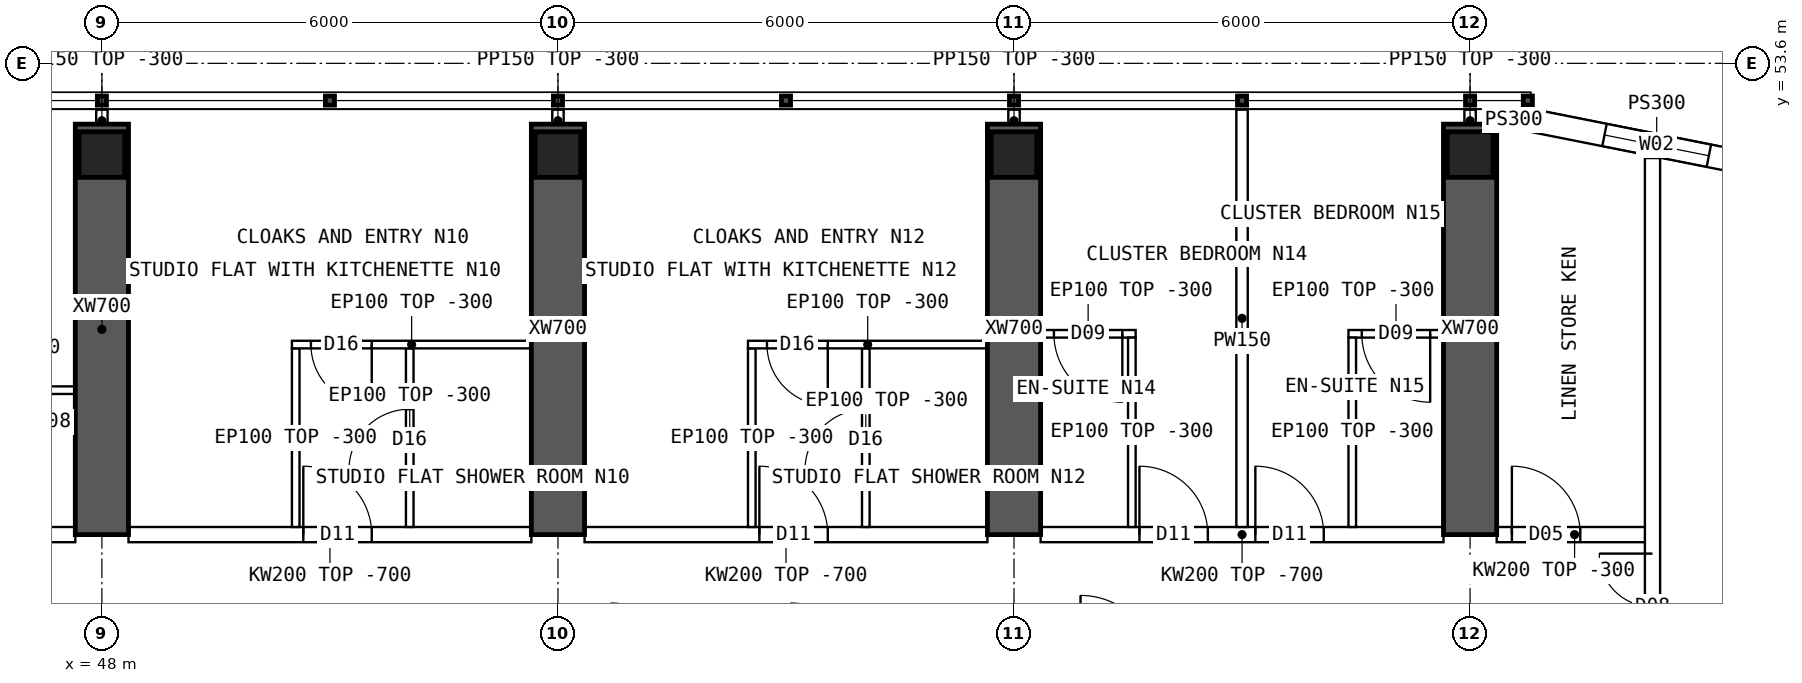
"""IFC4 building model, lengths in metres.
Left out: names, types, materials, properties, quantities, classifications, styles, units other than length and angle.
Written with IfcOpenShell. Run it as: python <this file> out.ifc"""

import sys

from ifc_helpers import new_model, si_unit, direction, frame, frame_2d, origin, origin_2d, place, context, subcontext, project, spatial, polyline, rectangle, hollow_rectangle, outline, extrude, element, fill, save


model = new_model("IFC4")
c1 = context("Model", 3, precision=1e-05, world=origin(), true_north=direction((0.0, 1.0)))
c2 = subcontext(c1, "Body", "Model", "MODEL_VIEW")
j1 = project(units=[si_unit("LENGTHUNIT", "METRE"), si_unit("PLANEANGLEUNIT", "RADIAN")], contexts=[c1])
p1 = place(None, origin())
s1 = spatial("IfcSite", under=j1, at=p1, CompositionType="ELEMENT")
p2 = place(p1, origin())
s2 = spatial("IfcBuilding", under=s1, at=p2, CompositionType="ELEMENT")
p3 = place(p2, frame((0.0, 0.0, 254.05)))
s3 = spatial("IfcBuildingStorey", under=s2, at=p3, CompositionType="ELEMENT", Elevation=254.05)
for number, where, z_axis, x_axis in (
    (1, (48.0, 52.4, 0.0), (0.0, 0.0, 1.0), (1.0, 0.0, 0.0)),
    (2, (54.0, 52.4, 0.0), (0.0, 0.0, 1.0), (1.0, 0.0, 0.0)),
    (3, (60.0, 52.4, 0.0), (0.0, 0.0, 1.0), (1.0, 0.0, 0.0)),
    (4, (66.0, 52.4, 0.0), (0.0, 0.0, 1.0), (1.0, 0.0, 0.0)),
):
    element("IfcColumn", number, at=place(p3, frame(where, z_axis=z_axis, x_axis=x_axis)), inside=s3, PredefinedType="COLUMN", context=c2, shape_type="SweptSolid", body=[
        extrude(hollow_rectangle(XDim=0.6, YDim=0.6, WallThickness=0.06, at=origin_2d()), origin(), (0.0, 0.0, 1.0), 3.75),
    ])
for number, where, z_axis, x_axis in (
    (5, (48.0, 47.4, 0.0), (0.0, 0.0, 1.0), (0.0, 1.0, 0.0)),
    (6, (54.0, 47.4, 0.0), (0.0, 0.0, 1.0), (0.0, 1.0, 0.0)),
    (7, (60.0, 47.4, 0.0), (0.0, 0.0, 1.0), (0.0, 1.0, 0.0)),
    (8, (66.0, 47.4, 0.0), (0.0, 0.0, 1.0), (0.0, 1.0, 0.0)),
):
    element("IfcWall", number, at=place(p3, frame(where, z_axis=z_axis, x_axis=x_axis)), inside=s3, PredefinedType="SHEAR", context=c2, shape_type="SweptSolid", body=[
        extrude(rectangle(XDim=5.4, YDim=0.7, at=frame_2d((2.7, 0.0))), origin(), (0.0, 0.0, 1.0), 3.75),
    ])
p4 = place(p3, frame((70.11, 52.192, 0.0), z_axis=(0.0, 0.0, 1.0), x_axis=(-0.98078325777, 0.195100490205, 0.0)))
e9 = element("IfcWall", 9, at=p4, inside=s3, PredefinedType="SOLIDWALL", context=c2, shape_type="SweptSolid", body=[
    extrude(outline(polyline([(-0.03, -0.15), (3.405, -0.15), (3.345, 0.15), (0.03, 0.15), (-0.03, -0.15)])), origin(), (0.0, 0.0, 1.0), 3.45),
])
p5 = place(p4, frame((0.988, 0.0, 0.9)))
e10 = element("IfcOpeningElement", 10, at=p5, cuts=e9, PredefinedType="OPENING", context=c2, shape_type="SweptSolid", body=[
    extrude(rectangle(XDim=1.4, YDim=1.8, at=frame_2d((0.7, 0.9))), frame((0.0, 0.16, 0.0), z_axis=(0.0, -1.0, 0.0), x_axis=(1.0, 0.0, 0.0)), (0.0, 0.0, 1.0), 0.32),
])
p6 = place(p3, frame((66.8, 52.85, 0.0), z_axis=(0.0, 0.0, 1.0), x_axis=(-1.0, 0.0, 0.0)))
e11 = element("IfcWall", 11, at=p6, inside=s3, PredefinedType="SOLIDWALL", context=c2, shape_type="SweptSolid", body=[
    extrude(rectangle(XDim=0.45, YDim=0.3, at=frame_2d((0.225, 0.0))), origin(), (0.0, 0.0, 1.0), 3.45),
])
p7 = place(p3, frame((42.35, 47.4, 0.0), z_axis=(0.0, 0.0, 1.0), x_axis=(1.0, 0.0, 0.0)))
e12 = element("IfcWall", 12, at=p7, inside=s3, PredefinedType="SOLIDWALL", context=c2, shape_type="SweptSolid", body=[
    extrude(outline(polyline([(0.0, 0.0), (5.3, 0.0), (5.3, 3.05), (0.0, 3.05), (0.0, 0.0)])), frame((0.0, 0.1, 0.0), z_axis=(0.0, -1.0, 0.0), x_axis=(1.0, 0.0, 0.0)), (0.0, 0.0, 1.0), 0.2),
])
p8 = place(p7, frame((0.1, 0.0, 0.0)))
e13 = element("IfcOpeningElement", 13, at=p8, cuts=e12, PredefinedType="OPENING", context=c2, shape_type="SweptSolid", body=[
    extrude(rectangle(XDim=0.9, YDim=2.1, at=frame_2d((0.45, 1.05))), frame((0.0, 0.11, 0.0), z_axis=(0.0, -1.0, 0.0), x_axis=(1.0, 0.0, 0.0)), (0.0, 0.0, 1.0), 0.22),
])
p9 = place(p3, frame((48.35, 47.4, 0.0), z_axis=(0.0, 0.0, 1.0), x_axis=(1.0, 0.0, 0.0)))
e14 = element("IfcWall", 14, at=p9, inside=s3, PredefinedType="SOLIDWALL", context=c2, shape_type="SweptSolid", body=[
    extrude(outline(polyline([(0.0, 0.0), (5.3, 0.0), (5.3, 3.05), (0.0, 3.05), (0.0, 0.0)])), frame((0.0, 0.1, 0.0), z_axis=(0.0, -1.0, 0.0), x_axis=(1.0, 0.0, 0.0)), (0.0, 0.0, 1.0), 0.2),
])
p10 = place(p9, frame((2.3, 0.0, 0.0)))
e15 = element("IfcOpeningElement", 15, at=p10, cuts=e14, PredefinedType="OPENING", context=c2, shape_type="SweptSolid", body=[
    extrude(rectangle(XDim=0.9, YDim=2.1, at=frame_2d((0.45, 1.05))), frame((0.0, 0.11, 0.0), z_axis=(0.0, -1.0, 0.0), x_axis=(1.0, 0.0, 0.0)), (0.0, 0.0, 1.0), 0.22),
])
p11 = place(p3, frame((54.35, 47.4, 0.0), z_axis=(0.0, 0.0, 1.0), x_axis=(1.0, 0.0, 0.0)))
e16 = element("IfcWall", 16, at=p11, inside=s3, PredefinedType="SOLIDWALL", context=c2, shape_type="SweptSolid", body=[
    extrude(outline(polyline([(0.0, 0.0), (5.3, 0.0), (5.3, 3.05), (0.0, 3.05), (0.0, 0.0)])), frame((0.0, 0.1, 0.0), z_axis=(0.0, -1.0, 0.0), x_axis=(1.0, 0.0, 0.0)), (0.0, 0.0, 1.0), 0.2),
])
p12 = place(p11, frame((2.3, 0.0, 0.0)))
e17 = element("IfcOpeningElement", 17, at=p12, cuts=e16, PredefinedType="OPENING", context=c2, shape_type="SweptSolid", body=[
    extrude(rectangle(XDim=0.9, YDim=2.1, at=frame_2d((0.45, 1.05))), frame((0.0, 0.11, 0.0), z_axis=(0.0, -1.0, 0.0), x_axis=(1.0, 0.0, 0.0)), (0.0, 0.0, 1.0), 0.22),
])
p13 = place(p3, frame((60.35, 47.4, 0.0), z_axis=(0.0, 0.0, 1.0), x_axis=(1.0, 0.0, 0.0)))
e18 = element("IfcWall", 18, at=p13, inside=s3, PredefinedType="SOLIDWALL", context=c2, shape_type="SweptSolid", body=[
    extrude(outline(polyline([(0.0, 0.0), (5.3, 0.0), (5.3, 3.05), (0.0, 3.05), (0.0, 0.0)])), frame((0.0, 0.1, 0.0), z_axis=(0.0, -1.0, 0.0), x_axis=(1.0, 0.0, 0.0)), (0.0, 0.0, 1.0), 0.2),
])
p14 = place(p13, frame((1.3, 0.0, 0.0)))
e19 = element("IfcOpeningElement", 19, at=p14, cuts=e18, PredefinedType="OPENING", context=c2, shape_type="SweptSolid", body=[
    extrude(rectangle(XDim=0.9, YDim=2.1, at=frame_2d((0.45, 1.05))), frame((0.0, 0.11, 0.0), z_axis=(0.0, -1.0, 0.0), x_axis=(1.0, 0.0, 0.0)), (0.0, 0.0, 1.0), 0.22),
])
p15 = place(p13, frame((2.825, 0.0, 0.0)))
e20 = element("IfcOpeningElement", 20, at=p15, cuts=e18, PredefinedType="OPENING", context=c2, shape_type="SweptSolid", body=[
    extrude(rectangle(XDim=0.9, YDim=2.1, at=frame_2d((0.45, 1.05))), frame((0.0, 0.11, 0.0), z_axis=(0.0, -1.0, 0.0), x_axis=(1.0, 0.0, 0.0)), (0.0, 0.0, 1.0), 0.22),
])
p16 = place(p3, frame((66.35, 47.4, 0.0), z_axis=(0.0, 0.0, 1.0), x_axis=(1.0, 0.0, 0.0)))
e21 = element("IfcWall", 21, at=p16, inside=s3, PredefinedType="SOLIDWALL", context=c2, shape_type="SweptSolid", body=[
    extrude(rectangle(XDim=2.05, YDim=0.2, at=frame_2d((1.025, 0.0))), origin(), (0.0, 0.0, 1.0), 3.45),
])
p17 = place(p16, frame((0.2, 0.0, 0.0)))
e22 = element("IfcOpeningElement", 22, at=p17, cuts=e21, PredefinedType="OPENING", context=c2, shape_type="SweptSolid", body=[
    extrude(rectangle(XDim=0.9, YDim=2.1, at=frame_2d((0.45, 1.05))), frame((0.0, 0.11, 0.0), z_axis=(0.0, -1.0, 0.0), x_axis=(1.0, 0.0, 0.0)), (0.0, 0.0, 1.0), 0.22),
])
p18 = place(p3, frame((45.1, 49.3, 0.0), z_axis=(0.0, 0.0, 1.0), x_axis=(1.0, 0.0, 0.0)))
e23 = element("IfcWall", 23, at=p18, inside=s3, PredefinedType="PARTITIONING", context=c2, shape_type="SweptSolid", body=[
    extrude(rectangle(XDim=2.55, YDim=0.1, at=frame_2d((1.275, 0.0))), origin(), (0.0, 0.0, 1.0), 3.45),
])
p19 = place(p18, frame((0.825, 0.0, 0.0)))
e24 = element("IfcOpeningElement", 24, at=p19, cuts=e23, PredefinedType="OPENING", context=c2, shape_type="SweptSolid", body=[
    extrude(rectangle(XDim=0.9, YDim=2.1, at=frame_2d((0.45, 1.05))), frame((0.0, 0.06, 0.0), z_axis=(0.0, -1.0, 0.0), x_axis=(1.0, 0.0, 0.0)), (0.0, 0.0, 1.0), 0.12),
])
p20 = place(p3, frame((50.5, 49.9, 0.0), z_axis=(0.0, 0.0, 1.0), x_axis=(1.0, 0.0, 0.0)))
e25 = element("IfcWall", 25, at=p20, inside=s3, PredefinedType="PARTITIONING", context=c2, shape_type="SweptSolid", body=[
    extrude(rectangle(XDim=3.15, YDim=0.1, at=frame_2d((1.575, 0.0))), origin(), (0.0, 0.0, 1.0), 3.45),
])
p21 = place(p20, frame((0.25, 0.0, 0.0)))
e26 = element("IfcOpeningElement", 26, at=p21, cuts=e25, PredefinedType="OPENING", context=c2, shape_type="SweptSolid", body=[
    extrude(rectangle(XDim=0.8, YDim=2.1, at=frame_2d((0.4, 1.05))), frame((0.0, 0.06, 0.0), z_axis=(0.0, -1.0, 0.0), x_axis=(1.0, 0.0, 0.0)), (0.0, 0.0, 1.0), 0.12),
])
p22 = place(p3, frame((50.55, 49.85, 0.0), z_axis=(0.0, 0.0, 1.0), x_axis=(0.0, -1.0, 0.0)))
e27 = element("IfcWall", 27, at=p22, inside=s3, PredefinedType="PARTITIONING", context=c2, shape_type="SweptSolid", body=[
    extrude(outline(polyline([(0.0, 0.0), (2.35, 0.0), (2.35, 3.05), (2.302, 3.05), (2.3, 3.45), (0.0, 3.45), (0.0, 0.0)])), frame((0.0, 0.05, 0.0), z_axis=(0.0, -1.0, 0.0), x_axis=(1.0, 0.0, 0.0)), (0.0, 0.0, 1.0), 0.1),
])
p23 = place(p3, frame((52.05, 49.85, 0.0), z_axis=(0.0, 0.0, 1.0), x_axis=(0.0, -1.0, 0.0)))
e28 = element("IfcWall", 28, at=p23, inside=s3, PredefinedType="PARTITIONING", context=c2, shape_type="SweptSolid", body=[
    extrude(outline(polyline([(0.0, 0.0), (2.35, 0.0), (2.35, 3.05), (2.302, 3.05), (2.3, 3.45), (0.0, 3.45), (0.0, 0.0)])), frame((0.0, 0.05, 0.0), z_axis=(0.0, -1.0, 0.0), x_axis=(1.0, 0.0, 0.0)), (0.0, 0.0, 1.0), 0.1),
])
p24 = place(p23, frame((0.8, 0.0, 0.0)))
e29 = element("IfcOpeningElement", 29, at=p24, cuts=e28, PredefinedType="OPENING", context=c2, shape_type="SweptSolid", body=[
    extrude(rectangle(XDim=0.8, YDim=2.1, at=frame_2d((0.4, 1.05))), frame((0.0, 0.06, 0.0), z_axis=(0.0, -1.0, 0.0), x_axis=(1.0, 0.0, 0.0)), (0.0, 0.0, 1.0), 0.12),
])
p25 = place(p3, frame((56.5, 49.9, 0.0), z_axis=(0.0, 0.0, 1.0), x_axis=(1.0, 0.0, 0.0)))
e30 = element("IfcWall", 30, at=p25, inside=s3, PredefinedType="PARTITIONING", context=c2, shape_type="SweptSolid", body=[
    extrude(rectangle(XDim=3.15, YDim=0.1, at=frame_2d((1.575, 0.0))), origin(), (0.0, 0.0, 1.0), 3.45),
])
p26 = place(p25, frame((0.25, 0.0, 0.0)))
e31 = element("IfcOpeningElement", 31, at=p26, cuts=e30, PredefinedType="OPENING", context=c2, shape_type="SweptSolid", body=[
    extrude(rectangle(XDim=0.8, YDim=2.1, at=frame_2d((0.4, 1.05))), frame((0.0, 0.06, 0.0), z_axis=(0.0, -1.0, 0.0), x_axis=(1.0, 0.0, 0.0)), (0.0, 0.0, 1.0), 0.12),
])
p27 = place(p3, frame((56.55, 49.85, 0.0), z_axis=(0.0, 0.0, 1.0), x_axis=(0.0, -1.0, 0.0)))
e32 = element("IfcWall", 32, at=p27, inside=s3, PredefinedType="PARTITIONING", context=c2, shape_type="SweptSolid", body=[
    extrude(outline(polyline([(0.0, 0.0), (2.35, 0.0), (2.35, 3.05), (2.302, 3.05), (2.3, 3.45), (0.0, 3.45), (0.0, 0.0)])), frame((0.0, 0.05, 0.0), z_axis=(0.0, -1.0, 0.0), x_axis=(1.0, 0.0, 0.0)), (0.0, 0.0, 1.0), 0.1),
])
p28 = place(p3, frame((58.05, 49.85, 0.0), z_axis=(0.0, 0.0, 1.0), x_axis=(0.0, -1.0, 0.0)))
e33 = element("IfcWall", 33, at=p28, inside=s3, PredefinedType="PARTITIONING", context=c2, shape_type="SweptSolid", body=[
    extrude(outline(polyline([(0.0, 0.0), (2.35, 0.0), (2.35, 3.05), (2.302, 3.05), (2.3, 3.45), (0.0, 3.45), (0.0, 0.0)])), frame((0.0, 0.05, 0.0), z_axis=(0.0, -1.0, 0.0), x_axis=(1.0, 0.0, 0.0)), (0.0, 0.0, 1.0), 0.1),
])
p29 = place(p28, frame((0.8, 0.0, 0.0)))
e34 = element("IfcOpeningElement", 34, at=p29, cuts=e33, PredefinedType="OPENING", context=c2, shape_type="SweptSolid", body=[
    extrude(rectangle(XDim=0.8, YDim=2.1, at=frame_2d((0.4, 1.05))), frame((0.0, 0.06, 0.0), z_axis=(0.0, -1.0, 0.0), x_axis=(1.0, 0.0, 0.0)), (0.0, 0.0, 1.0), 0.12),
])
p30 = place(p3, frame((63.0, 52.99, 0.0), z_axis=(0.0, 0.0, 1.0), x_axis=(0.0, -1.0, 0.0)))
e35 = element("IfcWall", 35, at=p30, inside=s3, PredefinedType="PARTITIONING", context=c2, shape_type="SweptSolid", body=[
    extrude(outline(polyline([(0.0, 0.0), (5.49, 0.0), (5.49, 3.05), (5.442, 3.05), (5.44, 3.45), (0.792, 3.45), (0.79, 3.05), (0.392, 3.05), (0.39, 3.45), (0.0, 3.45), (0.0, 0.0)])), frame((0.0, 0.075, 0.0), z_axis=(0.0, -1.0, 0.0), x_axis=(1.0, 0.0, 0.0)), (0.0, 0.0, 1.0), 0.15),
])
p31 = place(p3, frame((60.35, 50.042, 0.0), z_axis=(0.0, 0.0, 1.0), x_axis=(1.0, 0.0, 0.0)))
e36 = element("IfcWall", 36, at=p31, inside=s3, PredefinedType="PARTITIONING", context=c2, shape_type="SweptSolid", body=[
    extrude(rectangle(XDim=1.25, YDim=0.1, at=frame_2d((0.625, 0.0))), origin(), (0.0, 0.0, 1.0), 3.45),
])
p32 = place(p31, frame((0.175, 0.0, 0.0)))
e37 = element("IfcOpeningElement", 37, at=p32, cuts=e36, PredefinedType="OPENING", context=c2, shape_type="SweptSolid", body=[
    extrude(rectangle(XDim=0.9, YDim=2.1, at=frame_2d((0.45, 1.05))), frame((0.0, 0.06, 0.0), z_axis=(0.0, -1.0, 0.0), x_axis=(1.0, 0.0, 0.0)), (0.0, 0.0, 1.0), 0.12),
])
p33 = place(p3, frame((61.55, 49.992, 0.0), z_axis=(0.0, 0.0, 1.0), x_axis=(0.0, -1.0, 0.0)))
e38 = element("IfcWall", 38, at=p33, inside=s3, PredefinedType="PARTITIONING", context=c2, shape_type="SweptSolid", body=[
    extrude(outline(polyline([(0.0, 0.0), (2.492, 0.0), (2.492, 3.05), (2.444, 3.05), (2.442, 3.45), (0.0, 3.45), (0.0, 0.0)])), frame((0.0, 0.05, 0.0), z_axis=(0.0, -1.0, 0.0), x_axis=(1.0, 0.0, 0.0)), (0.0, 0.0, 1.0), 0.1),
])
p34 = place(p3, frame((64.4, 50.042, 0.0), z_axis=(0.0, 0.0, 1.0), x_axis=(1.0, 0.0, 0.0)))
e39 = element("IfcWall", 39, at=p34, inside=s3, PredefinedType="PARTITIONING", context=c2, shape_type="SweptSolid", body=[
    extrude(rectangle(XDim=1.25, YDim=0.1, at=frame_2d((0.625, 0.0))), origin(), (0.0, 0.0, 1.0), 3.45),
])
p35 = place(p34, frame((0.175, 0.0, 0.0)))
e40 = element("IfcOpeningElement", 40, at=p35, cuts=e39, PredefinedType="OPENING", context=c2, shape_type="SweptSolid", body=[
    extrude(rectangle(XDim=0.9, YDim=2.1, at=frame_2d((0.45, 1.05))), frame((0.0, 0.06, 0.0), z_axis=(0.0, -1.0, 0.0), x_axis=(1.0, 0.0, 0.0)), (0.0, 0.0, 1.0), 0.12),
])
p36 = place(p3, frame((64.45, 49.992, 0.0), z_axis=(0.0, 0.0, 1.0), x_axis=(0.0, -1.0, 0.0)))
e41 = element("IfcWall", 41, at=p36, inside=s3, PredefinedType="PARTITIONING", context=c2, shape_type="SweptSolid", body=[
    extrude(outline(polyline([(0.0, 0.0), (2.492, 0.0), (2.492, 3.05), (2.444, 3.05), (2.442, 3.45), (0.0, 3.45), (0.0, 0.0)])), frame((0.0, 0.05, 0.0), z_axis=(0.0, -1.0, 0.0), x_axis=(1.0, 0.0, 0.0)), (0.0, 0.0, 1.0), 0.1),
])
p37 = place(p3, frame((68.4, 11.646, 0.0), z_axis=(0.0, 0.0, 1.0), x_axis=(0.0, 1.0, 0.0)))
e42 = element("IfcWall", 42, at=p37, inside=s3, PredefinedType="SOLIDWALL", context=c2, shape_type="SweptSolid", body=[
    extrude(rectangle(XDim=40.708, YDim=0.2, at=frame_2d((20.354, 0.0))), origin(), (0.0, 0.0, 1.0), 3.45),
])
p38 = place(p37, frame((5.104, 0.0, 0.0)))
e43 = element("IfcOpeningElement", 43, at=p38, cuts=e42, PredefinedType="OPENING", context=c2, shape_type="SweptSolid", body=[
    extrude(rectangle(XDim=1.4, YDim=2.1, at=frame_2d((0.7, 1.05))), frame((0.0, 0.11, 0.0), z_axis=(0.0, -1.0, 0.0), x_axis=(1.0, 0.0, 0.0)), (0.0, 0.0, 1.0), 0.22),
])
p39 = place(p37, frame((34.104, 0.0, 0.0)))
e44 = element("IfcOpeningElement", 44, at=p39, cuts=e42, PredefinedType="OPENING", context=c2, shape_type="SweptSolid", body=[
    extrude(rectangle(XDim=1.4, YDim=2.1, at=frame_2d((0.7, 1.05))), frame((0.0, 0.11, 0.0), z_axis=(0.0, -1.0, 0.0), x_axis=(1.0, 0.0, 0.0)), (0.0, 0.0, 1.0), 0.22),
])
for number, where, z_axis, x_axis in (
    (45, (48.0, 52.7, 0.0), (0.0, 0.0, 1.0), (0.0, 1.0, 0.0)),
    (46, (54.0, 52.7, 0.0), (0.0, 0.0, 1.0), (0.0, 1.0, 0.0)),
    (47, (60.0, 52.7, 0.0), (0.0, 0.0, 1.0), (0.0, 1.0, 0.0)),
    (48, (66.0, 52.7, 0.0), (0.0, 0.0, 1.0), (0.0, 1.0, 0.0)),
):
    element("IfcWall", number, at=place(p3, frame(where, z_axis=z_axis, x_axis=x_axis)), inside=s3, PredefinedType="PARTITIONING", context=c2, shape_type="SweptSolid", body=[
        extrude(rectangle(XDim=0.29, YDim=0.15, at=frame_2d((0.145, 0.0))), origin(), (0.0, 0.0, 1.0), 3.45),
    ])
p40 = place(p5, origin())
e49 = element("IfcWindow", 49, at=p40, inside=s3, PartitioningType="SINGLE_PANEL", PredefinedType="WINDOW", context=c2, shape_type="SweptSolid", body=[
    extrude(rectangle(XDim=1.4, YDim=1.8, at=frame_2d((0.7, 0.9))), frame((0.0, 0.03, 0.0), z_axis=(0.0, -1.0, 0.0), x_axis=(1.0, 0.0, 0.0)), (0.0, 0.0, 1.0), 0.06),
])
fill(e10, e49)
p41 = place(p21, origin())
e50 = element("IfcDoor", 50, at=p41, inside=s3, OperationType="SINGLE_SWING_RIGHT", PredefinedType="DOOR", context=c2, shape_type="SweptSolid", body=[
    extrude(rectangle(XDim=0.8, YDim=2.1, at=frame_2d((0.4, 1.05))), frame((0.0, 0.025, 0.0), z_axis=(0.0, -1.0, 0.0), x_axis=(1.0, 0.0, 0.0)), (0.0, 0.0, 1.0), 0.05),
])
fill(e26, e50)
p42 = place(p24, origin())
e51 = element("IfcDoor", 51, at=p42, inside=s3, OperationType="SINGLE_SWING_RIGHT", PredefinedType="DOOR", context=c2, shape_type="SweptSolid", body=[
    extrude(rectangle(XDim=0.8, YDim=2.1, at=frame_2d((0.4, 1.05))), frame((0.0, 0.025, 0.0), z_axis=(0.0, -1.0, 0.0), x_axis=(1.0, 0.0, 0.0)), (0.0, 0.0, 1.0), 0.05),
])
fill(e29, e51)
p43 = place(p10, origin())
e52 = element("IfcDoor", 52, at=p43, inside=s3, OperationType="SINGLE_SWING_LEFT", PredefinedType="DOOR", context=c2, shape_type="SweptSolid", body=[
    extrude(rectangle(XDim=0.9, YDim=2.1, at=frame_2d((0.45, 1.05))), frame((0.0, 0.025, 0.0), z_axis=(0.0, -1.0, 0.0), x_axis=(1.0, 0.0, 0.0)), (0.0, 0.0, 1.0), 0.05),
])
fill(e15, e52)
p44 = place(p26, origin())
e53 = element("IfcDoor", 53, at=p44, inside=s3, OperationType="SINGLE_SWING_RIGHT", PredefinedType="DOOR", context=c2, shape_type="SweptSolid", body=[
    extrude(rectangle(XDim=0.8, YDim=2.1, at=frame_2d((0.4, 1.05))), frame((0.0, 0.025, 0.0), z_axis=(0.0, -1.0, 0.0), x_axis=(1.0, 0.0, 0.0)), (0.0, 0.0, 1.0), 0.05),
])
fill(e31, e53)
p45 = place(p29, origin())
e54 = element("IfcDoor", 54, at=p45, inside=s3, OperationType="SINGLE_SWING_RIGHT", PredefinedType="DOOR", context=c2, shape_type="SweptSolid", body=[
    extrude(rectangle(XDim=0.8, YDim=2.1, at=frame_2d((0.4, 1.05))), frame((0.0, 0.025, 0.0), z_axis=(0.0, -1.0, 0.0), x_axis=(1.0, 0.0, 0.0)), (0.0, 0.0, 1.0), 0.05),
])
fill(e34, e54)
p46 = place(p12, origin())
e55 = element("IfcDoor", 55, at=p46, inside=s3, OperationType="SINGLE_SWING_LEFT", PredefinedType="DOOR", context=c2, shape_type="SweptSolid", body=[
    extrude(rectangle(XDim=0.9, YDim=2.1, at=frame_2d((0.45, 1.05))), frame((0.0, 0.025, 0.0), z_axis=(0.0, -1.0, 0.0), x_axis=(1.0, 0.0, 0.0)), (0.0, 0.0, 1.0), 0.05),
])
fill(e17, e55)
p47 = place(p32, origin())
e56 = element("IfcDoor", 56, at=p47, inside=s3, OperationType="SINGLE_SWING_RIGHT", PredefinedType="DOOR", context=c2, shape_type="SweptSolid", body=[
    extrude(rectangle(XDim=0.9, YDim=2.1, at=frame_2d((0.45, 1.05))), frame((0.0, 0.025, 0.0), z_axis=(0.0, -1.0, 0.0), x_axis=(1.0, 0.0, 0.0)), (0.0, 0.0, 1.0), 0.05),
])
fill(e37, e56)
p48 = place(p14, origin())
e57 = element("IfcDoor", 57, at=p48, inside=s3, OperationType="SINGLE_SWING_LEFT", PredefinedType="DOOR", context=c2, shape_type="SweptSolid", body=[
    extrude(rectangle(XDim=0.9, YDim=2.1, at=frame_2d((0.45, 1.05))), frame((0.0, 0.025, 0.0), z_axis=(0.0, -1.0, 0.0), x_axis=(1.0, 0.0, 0.0)), (0.0, 0.0, 1.0), 0.05),
])
fill(e19, e57)
p49 = place(p35, origin())
e58 = element("IfcDoor", 58, at=p49, inside=s3, OperationType="SINGLE_SWING_RIGHT", PredefinedType="DOOR", context=c2, shape_type="SweptSolid", body=[
    extrude(rectangle(XDim=0.9, YDim=2.1, at=frame_2d((0.45, 1.05))), frame((0.0, 0.025, 0.0), z_axis=(0.0, -1.0, 0.0), x_axis=(1.0, 0.0, 0.0)), (0.0, 0.0, 1.0), 0.05),
])
fill(e40, e58)
p50 = place(p15, origin())
e59 = element("IfcDoor", 59, at=p50, inside=s3, OperationType="SINGLE_SWING_LEFT", PredefinedType="DOOR", context=c2, shape_type="SweptSolid", body=[
    extrude(rectangle(XDim=0.9, YDim=2.1, at=frame_2d((0.45, 1.05))), frame((0.0, 0.025, 0.0), z_axis=(0.0, -1.0, 0.0), x_axis=(1.0, 0.0, 0.0)), (0.0, 0.0, 1.0), 0.05),
])
fill(e20, e59)
p51 = place(p39, origin())
e60 = element("IfcDoor", 60, at=p51, inside=s3, OperationType="DOUBLE_DOOR_SINGLE_SWING", PredefinedType="DOOR", context=c2, shape_type="SweptSolid", body=[
    extrude(rectangle(XDim=1.4, YDim=2.1, at=frame_2d((0.7, 1.05))), frame((0.0, 0.025, 0.0), z_axis=(0.0, -1.0, 0.0), x_axis=(1.0, 0.0, 0.0)), (0.0, 0.0, 1.0), 0.05),
])
fill(e44, e60)
p52 = place(p17, origin())
e61 = element("IfcDoor", 61, at=p52, inside=s3, OperationType="SINGLE_SWING_LEFT", PredefinedType="DOOR", context=c2, shape_type="SweptSolid", body=[
    extrude(rectangle(XDim=0.9, YDim=2.1, at=frame_2d((0.45, 1.05))), frame((0.0, 0.025, 0.0), z_axis=(0.0, -1.0, 0.0), x_axis=(1.0, 0.0, 0.0)), (0.0, 0.0, 1.0), 0.05),
])
fill(e22, e61)
save(model, sys.argv[1])
